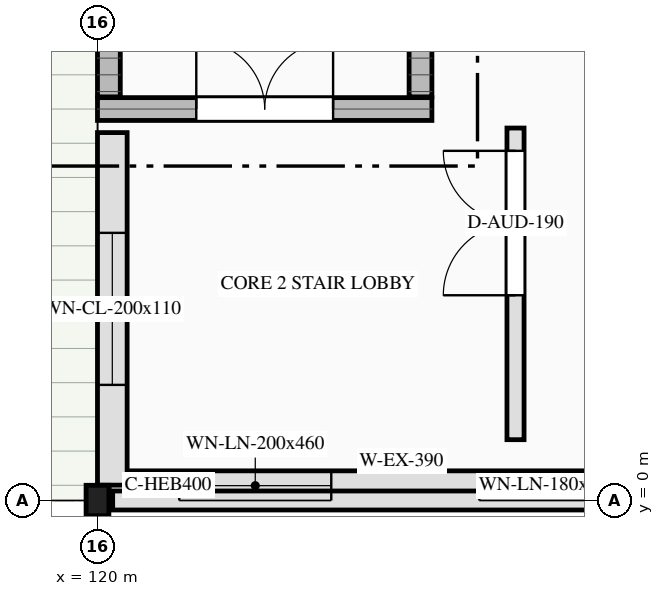
"""IFC4 building model, lengths in metres.
Left out: names, types, materials, properties, quantities, classifications, styles, units other than length and angle.
Written with IfcOpenShell. Run it as: python <this file> out.ifc"""

import sys

from ifc_helpers import new_model, si_unit, direction, frame, frame_2d, origin, origin_2d, place, context, subcontext, project, spatial, rectangle, i_section, extrude, element, fill, save


model = new_model("IFC4")
c1 = context("Model", 3, precision=1e-05, world=origin(), true_north=direction((0.0, 1.0)))
c2 = subcontext(c1, "Body", "Model", "MODEL_VIEW")
j1 = project(units=[si_unit("LENGTHUNIT", "METRE"), si_unit("PLANEANGLEUNIT", "RADIAN")], contexts=[c1])
p1 = place(None, origin())
s1 = spatial("IfcSite", under=j1, at=p1, CompositionType="ELEMENT")
p2 = place(p1, origin())
s2 = spatial("IfcBuilding", under=s1, at=p2, CompositionType="ELEMENT")
p3 = place(p2, frame((0.0, 0.0, 26.0)))
s3 = spatial("IfcBuildingStorey", under=s2, at=p3, CompositionType="ELEMENT", Elevation=26.0)
p4 = place(p3, frame((120.0, 5.15, 0.0), z_axis=(0.0, 0.0, 1.0), x_axis=(1.0, 0.0, 0.0)))
e1 = element("IfcWall", 1, at=p4, inside=s3, PredefinedType="SHEAR", context=c2, shape_type="SweptSolid", body=[
    extrude(rectangle(XDim=4.4, YDim=0.3, at=frame_2d((2.2, 0.0))), origin(), (0.0, 0.0, 1.0), 8.0),
])
p5 = place(p4, frame((1.3, 0.0, 0.0)))
e2 = element("IfcOpeningElement", 2, at=p5, cuts=e1, PredefinedType="OPENING", context=c2, shape_type="SweptSolid", body=[
    extrude(rectangle(XDim=1.8, YDim=2.2, at=frame_2d((0.9, 1.1))), frame((0.0, 0.16, 0.0), z_axis=(0.0, -1.0, 0.0), x_axis=(1.0, 0.0, 0.0)), (0.0, 0.0, 1.0), 0.32),
])
for number, where, z_axis, x_axis in (
    (3, (120.15, 5.31, 0.0), (0.0, 0.0, 1.0), (0.0, 1.0, 0.0)),
    (4, (124.25, 5.31, 0.0), (0.0, 0.0, 1.0), (0.0, 1.0, 0.0)),
):
    element("IfcWall", number, at=place(p3, frame(where, z_axis=z_axis, x_axis=x_axis)), inside=s3, PredefinedType="SHEAR", context=c2, shape_type="SweptSolid", body=[
        extrude(rectangle(XDim=9.38, YDim=0.3, at=frame_2d((4.69, 0.0))), origin(), (0.0, 0.0, 1.0), 8.0),
    ])
p6 = place(p3, frame((120.0, 0.0, 0.0), z_axis=(0.0, 0.0, 1.0), x_axis=(1.0, 0.0, 0.0)))
e5 = element("IfcColumn", 5, at=p6, inside=s3, PredefinedType="COLUMN", context=c2, shape_type="SweptSolid", body=[
    extrude(i_section(OverallWidth=0.3, OverallDepth=0.4, WebThickness=0.013, FlangeThickness=0.024, FilletRadius=0.027, at=origin_2d()), origin(), (0.0, 0.0, 1.0), 8.0),
])
p7 = place(p3, frame((127.848, 0.195, 0.0), z_axis=(0.0, 0.0, 1.0), x_axis=(-1.0, 0.0, 0.0)))
e6 = element("IfcWall", 6, at=p7, inside=s3, PredefinedType="SOLIDWALL", context=c2, shape_type="SweptSolid", body=[
    extrude(rectangle(XDim=7.696, YDim=0.39, at=frame_2d((3.848, 0.0))), origin(), (0.0, 0.0, 1.0), 7.495),
])
p8 = place(p7, frame((1.024, 0.0, 0.85)))
e7 = element("IfcOpeningElement", 7, at=p8, cuts=e6, PredefinedType="OPENING", context=c2, shape_type="SweptSolid", body=[
    extrude(rectangle(XDim=1.8, YDim=4.2, at=frame_2d((0.9, 2.1))), frame((0.0, 0.205, 0.0), z_axis=(0.0, -1.0, 0.0), x_axis=(1.0, 0.0, 0.0)), (0.0, 0.0, 1.0), 0.41),
])
p9 = place(p7, frame((4.772, 0.0, 0.85)))
e8 = element("IfcOpeningElement", 8, at=p9, cuts=e6, PredefinedType="OPENING", context=c2, shape_type="SweptSolid", body=[
    extrude(rectangle(XDim=2.0, YDim=4.6, at=frame_2d((1.0, 2.3))), frame((0.0, 0.205, 0.0), z_axis=(0.0, -1.0, 0.0), x_axis=(1.0, 0.0, 0.0)), (0.0, 0.0, 1.0), 0.41),
])
p10 = place(p3, frame((120.195, 0.202, 0.0), z_axis=(0.0, 0.0, 1.0), x_axis=(0.0, 1.0, 0.0)))
e9 = element("IfcWall", 9, at=p10, inside=s3, PredefinedType="SOLIDWALL", context=c2, shape_type="SweptSolid", body=[
    extrude(rectangle(XDim=4.638, YDim=0.39, at=frame_2d((2.319, 0.0))), origin(), (0.0, 0.0, 1.0), 7.495),
])
p11 = place(p10, frame((1.319, 0.0, 2.0)))
e10 = element("IfcOpeningElement", 10, at=p11, cuts=e9, PredefinedType="OPENING", context=c2, shape_type="SweptSolid", body=[
    extrude(rectangle(XDim=2.0, YDim=1.1, at=frame_2d((1.0, 0.55))), frame((0.0, 0.205, 0.0), z_axis=(0.0, -1.0, 0.0), x_axis=(1.0, 0.0, 0.0)), (0.0, 0.0, 1.0), 0.41),
])
p12 = place(p3, frame((120.2, 0.0, 8.0), z_axis=(0.0, 0.0, 1.0), x_axis=(1.0, 0.0, 0.0)))
e11 = element("IfcWall", 11, at=p12, inside=s3, PredefinedType="PARAPET", context=c2, shape_type="SweptSolid", body=[
    extrude(rectangle(XDim=47.6, YDim=0.25, at=frame_2d((23.8, 0.0))), origin(), (0.0, 0.0, 1.0), 0.55),
])
p13 = place(p3, frame((125.5, 0.8, 0.0), z_axis=(0.0, 0.0, 1.0), x_axis=(0.0, 1.0, 0.0)))
e12 = element("IfcWall", 12, at=p13, inside=s3, PredefinedType="SOLIDWALL", context=c2, shape_type="SweptSolid", body=[
    extrude(rectangle(XDim=4.1, YDim=0.225, at=frame_2d((2.05, 0.0))), origin(), (0.0, 0.0, 1.0), 7.82),
])
p14 = place(p13, frame((1.9, 0.0, 0.0)))
e13 = element("IfcOpeningElement", 13, at=p14, cuts=e12, PredefinedType="OPENING", context=c2, shape_type="SweptSolid", body=[
    extrude(rectangle(XDim=1.9, YDim=2.35, at=frame_2d((0.95, 1.175))), frame((0.0, 0.123, 0.0), z_axis=(0.0, -1.0, 0.0), x_axis=(1.0, 0.0, 0.0)), (0.0, 0.0, 1.0), 0.245),
])
p15 = place(p8, origin())
e14 = element("IfcWindow", 14, at=p15, inside=s3, PartitioningType="DOUBLE_PANEL_VERTICAL", PredefinedType="WINDOW", context=c2, shape_type="SweptSolid", body=[
    extrude(rectangle(XDim=1.8, YDim=4.2, at=frame_2d((0.9, 2.1))), frame((0.0, 0.03, 0.0), z_axis=(0.0, -1.0, 0.0), x_axis=(1.0, 0.0, 0.0)), (0.0, 0.0, 1.0), 0.06),
])
fill(e7, e14)
p16 = place(p9, origin())
e15 = element("IfcWindow", 15, at=p16, inside=s3, PartitioningType="TRIPLE_PANEL_VERTICAL", PredefinedType="WINDOW", context=c2, shape_type="SweptSolid", body=[
    extrude(rectangle(XDim=2.0, YDim=4.6, at=frame_2d((1.0, 2.3))), frame((0.0, 0.03, 0.0), z_axis=(0.0, -1.0, 0.0), x_axis=(1.0, 0.0, 0.0)), (0.0, 0.0, 1.0), 0.06),
])
fill(e8, e15)
p17 = place(p11, origin())
e16 = element("IfcWindow", 16, at=p17, inside=s3, PartitioningType="DOUBLE_PANEL_HORIZONTAL", PredefinedType="WINDOW", context=c2, shape_type="SweptSolid", body=[
    extrude(rectangle(XDim=2.0, YDim=1.1, at=frame_2d((1.0, 0.55))), frame((0.0, 0.03, 0.0), z_axis=(0.0, -1.0, 0.0), x_axis=(1.0, 0.0, 0.0)), (0.0, 0.0, 1.0), 0.06),
])
fill(e10, e16)
p18 = place(p5, origin())
e17 = element("IfcDoor", 17, at=p18, inside=s3, OperationType="DOUBLE_DOOR_SINGLE_SWING", PredefinedType="DOOR", context=c2, shape_type="SweptSolid", body=[
    extrude(rectangle(XDim=1.8, YDim=2.2, at=frame_2d((0.9, 1.1))), frame((0.0, 0.025, 0.0), z_axis=(0.0, -1.0, 0.0), x_axis=(1.0, 0.0, 0.0)), (0.0, 0.0, 1.0), 0.05),
])
fill(e2, e17)
p19 = place(p14, origin())
e18 = element("IfcDoor", 18, at=p19, inside=s3, OperationType="DOUBLE_DOOR_SINGLE_SWING", PredefinedType="DOOR", context=c2, shape_type="SweptSolid", body=[
    extrude(rectangle(XDim=1.9, YDim=2.35, at=frame_2d((0.95, 1.175))), frame((0.0, 0.025, 0.0), z_axis=(0.0, -1.0, 0.0), x_axis=(1.0, 0.0, 0.0)), (0.0, 0.0, 1.0), 0.05),
])
fill(e13, e18)
save(model, sys.argv[1])
